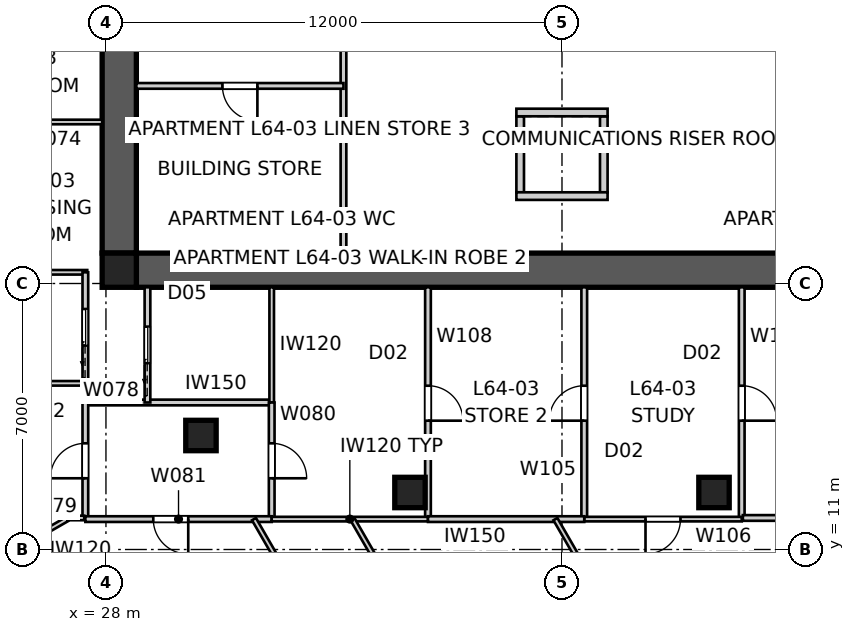
"""IFC4 building model, lengths in metres.
Left out: names, types, materials, properties, quantities, classifications, styles, units other than length and angle.
Written with IfcOpenShell. Run it as: python <this file> out.ifc"""

import sys

from ifc_helpers import new_model, si_unit, direction, frame, frame_2d, origin, origin_2d, place, context, subcontext, project, spatial, polyline, rectangle, outline, extrude, element, fill, save


model = new_model("IFC4")
c1 = context("Model", 3, precision=1e-05, world=origin(), true_north=direction((0.0, 1.0)))
c2 = subcontext(c1, "Body", "Model", "MODEL_VIEW")
j1 = project(units=[si_unit("LENGTHUNIT", "METRE"), si_unit("PLANEANGLEUNIT", "RADIAN")], contexts=[c1])
p1 = place(None, origin())
s1 = spatial("IfcSite", under=j1, at=p1, CompositionType="ELEMENT")
p2 = place(p1, origin())
s2 = spatial("IfcBuilding", under=s1, at=p2, CompositionType="ELEMENT")
p3 = place(p2, frame((0.0, 0.0, 232.0)))
s3 = spatial("IfcBuildingStorey", under=s2, at=p3, CompositionType="ELEMENT", Elevation=232.0)
p4 = place(p3, frame((51.2, 18.35, 0.0), z_axis=(0.0, 0.0, 1.0), x_axis=(-1.0, 0.0, 0.0)))
e1 = element("IfcWall", 1, at=p4, inside=s3, PredefinedType="SHEAR", context=c2, shape_type="SweptSolid", body=[
    extrude(outline(polyline([(0.0, -0.45), (22.4, -0.45), (22.4, -0.025), (22.85, -0.025), (22.85, 0.025), (22.4, 0.025), (22.4, 0.45), (0.0, 0.45), (0.0, 0.025), (-0.45, 0.025), (-0.45, -0.025), (0.0, -0.025), (0.0, -0.45)])), origin(), (0.0, 0.0, 1.0), 3.4),
])
p5 = place(p3, frame((28.35, 41.2, 0.0), z_axis=(0.0, 0.0, 1.0), x_axis=(0.0, -1.0, 0.0)))
e2 = element("IfcWall", 2, at=p5, inside=s3, PredefinedType="SHEAR", context=c2, shape_type="SweptSolid", body=[
    extrude(outline(polyline([(0.0, -0.45), (22.4, -0.45), (22.4, -0.025), (22.85, -0.025), (22.85, 0.025), (22.4, 0.025), (22.4, 0.45), (0.0, 0.45), (0.0, 0.025), (-0.45, 0.025), (-0.45, -0.025), (0.0, -0.025), (0.0, -0.45)])), origin(), (0.0, 0.0, 1.0), 3.4),
])
p6 = place(p5, frame((11.14, 0.0, 0.0)))
e3 = element("IfcOpeningElement", 3, at=p6, cuts=e2, PredefinedType="OPENING", context=c2, shape_type="SweptSolid", body=[
    extrude(rectangle(XDim=1.02, YDim=2.4, at=frame_2d((0.51, 1.2))), frame((0.0, 0.46, 0.0), z_axis=(0.0, -1.0, 0.0), x_axis=(1.0, 0.0, 0.0)), (0.0, 0.0, 1.0), 0.92),
])
for number, where, z_axis, x_axis in (
    (4, (38.9, 22.4, 0.0), (0.0, 0.0, 1.0), (0.0, -1.0, 0.0)),
    (5, (41.1, 22.4, 0.0), (0.0, 0.0, 1.0), (0.0, -1.0, 0.0)),
):
    element("IfcWall", number, at=place(p3, frame(where, z_axis=z_axis, x_axis=x_axis)), inside=s3, PredefinedType="SOLIDWALL", context=c2, shape_type="SweptSolid", body=[
        extrude(rectangle(XDim=2.0, YDim=0.2, at=frame_2d((1.0, 0.0))), origin(), (0.0, 0.0, 1.0), 3.4),
    ])
for number, where, z_axis, x_axis in (
    (6, (38.8, 22.5, 0.0), (0.0, 0.0, 1.0), (1.0, 0.0, 0.0)),
    (7, (38.8, 20.3, 0.0), (0.0, 0.0, 1.0), (1.0, 0.0, 0.0)),
):
    element("IfcWall", number, at=place(p3, frame(where, z_axis=z_axis, x_axis=x_axis)), inside=s3, PredefinedType="SOLIDWALL", context=c2, shape_type="SweptSolid", body=[
        extrude(rectangle(XDim=2.4, YDim=0.2, at=frame_2d((1.2, 0.0))), origin(), (0.0, 0.0, 1.0), 3.4),
    ])
p7 = place(p3, frame((28.35, 18.35, 0.0), z_axis=(0.0, 0.0, 1.0), x_axis=(1.0, 0.0, 0.0)))
e8 = element("IfcColumn", 8, at=p7, inside=s3, PredefinedType="COLUMN", context=c2, shape_type="SweptSolid", body=[
    extrude(rectangle(XDim=0.9, YDim=0.9, at=origin_2d()), origin(), (0.0, 0.0, 1.0), 3.4),
])
for number, where, z_axis, x_axis in (
    (9, (30.5, 14.0, 0.0), (0.0, 0.0, 1.0), (1.0, 0.0, 0.0)),
    (10, (36.0, 12.5, 0.0), (0.0, 0.0, 1.0), (1.0, 0.0, 0.0)),
    (11, (44.0, 12.5, 0.0), (0.0, 0.0, 1.0), (1.0, 0.0, 0.0)),
):
    element("IfcColumn", number, at=place(p3, frame(where, z_axis=z_axis, x_axis=x_axis)), inside=s3, PredefinedType="COLUMN", context=c2, shape_type="SweptSolid", body=[
        extrude(rectangle(XDim=0.8, YDim=0.8, at=origin_2d()), origin(), (0.0, 0.0, 1.0), 3.4),
    ])
p8 = place(p3, frame((34.25, 18.8, 0.0), z_axis=(0.0, 0.0, 1.0), x_axis=(0.0, 1.0, 0.0)))
e12 = element("IfcWall", 12, at=p8, inside=s3, PredefinedType="SOLIDWALL", context=c2, shape_type="SweptSolid", body=[
    extrude(rectangle(XDim=5.9, YDim=0.15, at=frame_2d((2.95, 0.0))), origin(), (0.0, 0.0, 1.0), 3.2),
])
p9 = place(p3, frame((34.25, 23.2, 0.0), z_axis=(0.0, 0.0, 1.0), x_axis=(-1.0, 0.0, 0.0)))
e13 = element("IfcWall", 13, at=p9, inside=s3, PredefinedType="SOLIDWALL", context=c2, shape_type="SweptSolid", body=[
    extrude(rectangle(XDim=5.45, YDim=0.15, at=frame_2d((2.725, 0.0))), origin(), (0.0, 0.0, 1.0), 3.2),
])
p10 = place(p9, frame((2.265, 0.0, 0.0)))
e14 = element("IfcOpeningElement", 14, at=p10, cuts=e13, PredefinedType="OPENING", context=c2, shape_type="SweptSolid", body=[
    extrude(rectangle(XDim=0.92, YDim=2.1, at=frame_2d((0.46, 1.05))), frame((0.0, 0.085, 0.0), z_axis=(0.0, -1.0, 0.0), x_axis=(1.0, 0.0, 0.0)), (0.0, 0.0, 1.0), 0.17),
])
p11 = place(p3, frame((27.9, 22.25, 0.0), z_axis=(0.0, 0.0, 1.0), x_axis=(-1.0, 0.0, 0.0)))
e15 = element("IfcWall", 15, at=p11, inside=s3, PredefinedType="PARTITIONING", context=c2, shape_type="SweptSolid", body=[
    extrude(rectangle(XDim=6.1, YDim=0.12, at=frame_2d((3.05, 0.0))), origin(), (0.0, 0.0, 1.0), 3.2),
])
p12 = place(p11, frame((2.57, 0.0, 0.0)))
e16 = element("IfcOpeningElement", 16, at=p12, cuts=e15, PredefinedType="OPENING", context=c2, shape_type="SweptSolid", body=[
    extrude(rectangle(XDim=0.96, YDim=2.1, at=frame_2d((0.48, 1.05))), frame((0.0, 0.07, 0.0), z_axis=(0.0, -1.0, 0.0), x_axis=(1.0, 0.0, 0.0)), (0.0, 0.0, 1.0), 0.14),
])
p13 = place(p3, frame((27.508, 18.295, 0.0), z_axis=(0.0, 0.0, 1.0), x_axis=(-1.0, 0.0, 0.0)))
e17 = element("IfcWall", 17, at=p13, inside=s3, PredefinedType="PARTITIONING", context=c2, shape_type="SweptSolid", body=[
    extrude(rectangle(XDim=5.708, YDim=0.12, at=frame_2d((2.854, 0.0))), origin(), (0.0, 0.0, 1.0), 3.2),
])
p14 = place(p3, frame((32.361, 14.869, 0.0), z_axis=(0.0, 0.0, 1.0), x_axis=(-1.0, 0.0, 0.0)))
e18 = element("IfcWall", 18, at=p14, inside=s3, PredefinedType="SOLIDWALL", context=c2, shape_type="SweptSolid", body=[
    extrude(rectangle(XDim=4.903, YDim=0.15, at=frame_2d((2.452, 0.0))), origin(), (0.0, 0.0, 1.0), 3.2),
])
p15 = place(p3, frame((32.361, 17.9, 0.0), z_axis=(0.0, 0.0, 1.0), x_axis=(0.0, -1.0, 0.0)))
e19 = element("IfcWall", 19, at=p15, inside=s3, PredefinedType="PARTITIONING", context=c2, shape_type="SweptSolid", body=[
    extrude(rectangle(XDim=3.031, YDim=0.12, at=frame_2d((1.516, 0.0))), origin(), (0.0, 0.0, 1.0), 3.2),
])
p16 = place(p3, frame((29.092, 14.869, 0.0), z_axis=(0.0, 0.0, 1.0), x_axis=(0.0, 1.0, 0.0)))
e20 = element("IfcWall", 20, at=p16, inside=s3, PredefinedType="SOLIDWALL", context=c2, shape_type="SweptSolid", body=[
    extrude(rectangle(XDim=3.031, YDim=0.15, at=frame_2d((1.516, 0.0))), origin(), (0.0, 0.0, 1.0), 3.2),
])
p17 = place(p16, frame((1.036, 0.0, 0.0)))
e21 = element("IfcOpeningElement", 21, at=p17, cuts=e20, PredefinedType="OPENING", context=c2, shape_type="SweptSolid", body=[
    extrude(rectangle(XDim=0.96, YDim=2.1, at=frame_2d((0.48, 1.05))), frame((0.0, 0.085, 0.0), z_axis=(0.0, -1.0, 0.0), x_axis=(1.0, 0.0, 0.0)), (0.0, 0.0, 1.0), 0.17),
])
p18 = place(p3, frame((27.458, 11.8, 0.0), z_axis=(0.0, 0.0, 1.0), x_axis=(0.0, 1.0, 0.0)))
e22 = element("IfcWall", 22, at=p18, inside=s3, PredefinedType="SOLIDWALL", context=c2, shape_type="SweptSolid", body=[
    extrude(rectangle(XDim=6.495, YDim=0.15, at=frame_2d((3.248, 0.0))), origin(), (0.0, 0.0, 1.0), 3.2),
])
p19 = place(p18, frame((4.569, 0.0, 0.0)))
e23 = element("IfcOpeningElement", 23, at=p19, cuts=e22, PredefinedType="OPENING", context=c2, shape_type="SweptSolid", body=[
    extrude(rectangle(XDim=0.96, YDim=2.0, at=frame_2d((0.48, 1.0))), frame((0.0, 0.085, 0.0), z_axis=(0.0, -1.0, 0.0), x_axis=(1.0, 0.0, 0.0)), (0.0, 0.0, 1.0), 0.17),
])
p20 = place(p18, frame((1.074, 0.0, 0.0)))
e24 = element("IfcOpeningElement", 24, at=p20, cuts=e22, PredefinedType="OPENING", context=c2, shape_type="SweptSolid", body=[
    extrude(rectangle(XDim=0.92, YDim=2.34, at=frame_2d((0.46, 1.17))), frame((0.0, 0.085, 0.0), z_axis=(0.0, -1.0, 0.0), x_axis=(1.0, 0.0, 0.0)), (0.0, 0.0, 1.0), 0.17),
])
p21 = place(p3, frame((32.361, 14.869, 0.0), z_axis=(0.0, 0.0, 1.0), x_axis=(0.0, -1.0, 0.0)))
e25 = element("IfcWall", 25, at=p21, inside=s3, PredefinedType="SOLIDWALL", context=c2, shape_type="SweptSolid", body=[
    extrude(rectangle(XDim=3.069, YDim=0.15, at=frame_2d((1.534, 0.0))), origin(), (0.0, 0.0, 1.0), 3.2),
])
p22 = place(p21, frame((1.074, 0.0, 0.0)))
e26 = element("IfcOpeningElement", 26, at=p22, cuts=e25, PredefinedType="OPENING", context=c2, shape_type="SweptSolid", body=[
    extrude(rectangle(XDim=0.92, YDim=2.1, at=frame_2d((0.46, 1.05))), frame((0.0, 0.085, 0.0), z_axis=(0.0, -1.0, 0.0), x_axis=(1.0, 0.0, 0.0)), (0.0, 0.0, 1.0), 0.17),
])
p23 = place(p3, frame((32.361, 11.8, 0.0), z_axis=(0.0, 0.0, 1.0), x_axis=(-1.0, 0.0, 0.0)))
e27 = element("IfcWall", 27, at=p23, inside=s3, PredefinedType="SOLIDWALL", context=c2, shape_type="SweptSolid", body=[
    extrude(rectangle(XDim=4.903, YDim=0.15, at=frame_2d((2.452, 0.0))), origin(), (0.0, 0.0, 1.0), 3.2),
])
p24 = place(p23, frame((2.196, 0.0, 0.0)))
e28 = element("IfcOpeningElement", 28, at=p24, cuts=e27, PredefinedType="OPENING", context=c2, shape_type="SweptSolid", body=[
    extrude(rectangle(XDim=0.92, YDim=2.34, at=frame_2d((0.46, 1.17))), frame((0.0, 0.085, 0.0), z_axis=(0.0, -1.0, 0.0), x_axis=(1.0, 0.0, 0.0)), (0.0, 0.0, 1.0), 0.17),
])
p25 = place(p3, frame((22.51, 15.373, 0.0), z_axis=(0.0, 0.0, 1.0), x_axis=(1.0, 0.0, 0.0)))
e29 = element("IfcWall", 29, at=p25, inside=s3, PredefinedType="PARTITIONING", context=c2, shape_type="SweptSolid", body=[
    extrude(rectangle(XDim=4.918, YDim=0.12, at=frame_2d((2.459, 0.0))), origin(), (0.0, 0.0, 1.0), 3.2),
])
p26 = place(p25, frame((1.973, 0.0, 0.0)))
e30 = element("IfcOpeningElement", 30, at=p26, cuts=e29, PredefinedType="OPENING", context=c2, shape_type="SweptSolid", body=[
    extrude(rectangle(XDim=0.96, YDim=2.1, at=frame_2d((0.48, 1.05))), frame((0.0, 0.07, 0.0), z_axis=(0.0, -1.0, 0.0), x_axis=(1.0, 0.0, 0.0)), (0.0, 0.0, 1.0), 0.14),
])
p27 = place(p3, frame((27.428, 11.83, 0.0), z_axis=(0.0, 0.0, 1.0), x_axis=(-1.0, 0.0, 0.0)))
e31 = element("IfcWall", 31, at=p27, inside=s3, PredefinedType="PARTITIONING", context=c2, shape_type="SweptSolid", body=[
    extrude(rectangle(XDim=0.421, YDim=0.12, at=frame_2d((0.211, 0.0))), origin(), (0.0, 0.0, 1.0), 3.2),
])
p28 = place(p3, frame((26.976, 11.8, 0.0), z_axis=(0.0, 0.0, 1.0), x_axis=(-0.866046860819, -0.499962833484, 0.0)))
e32 = element("IfcWall", 32, at=p28, inside=s3, PredefinedType="PARTITIONING", context=c2, shape_type="SweptSolid", body=[
    extrude(rectangle(XDim=2.081, YDim=0.12, at=frame_2d((1.041, 0.0))), origin(), (0.0, 0.0, 1.0), 3.2),
])
p29 = place(p3, frame((44.729, 17.9, 0.0), z_axis=(0.0, 0.0, 1.0), x_axis=(0.0, -1.0, 0.0)))
e33 = element("IfcWall", 33, at=p29, inside=s3, PredefinedType="SOLIDWALL", context=c2, shape_type="SweptSolid", body=[
    extrude(rectangle(XDim=6.1, YDim=0.15, at=frame_2d((3.05, 0.0))), origin(), (0.0, 0.0, 1.0), 3.2),
])
p30 = place(p29, frame((2.59, 0.0, 0.0)))
e34 = element("IfcOpeningElement", 34, at=p30, cuts=e33, PredefinedType="OPENING", context=c2, shape_type="SweptSolid", body=[
    extrude(rectangle(XDim=0.92, YDim=2.34, at=frame_2d((0.46, 1.17))), frame((0.0, 0.085, 0.0), z_axis=(0.0, -1.0, 0.0), x_axis=(1.0, 0.0, 0.0)), (0.0, 0.0, 1.0), 0.17),
])
p31 = place(p3, frame((40.586, 11.8, 0.0), z_axis=(0.0, 0.0, 1.0), x_axis=(0.0, 1.0, 0.0)))
e35 = element("IfcWall", 35, at=p31, inside=s3, PredefinedType="SOLIDWALL", context=c2, shape_type="SweptSolid", body=[
    extrude(rectangle(XDim=6.1, YDim=0.15, at=frame_2d((3.05, 0.0))), origin(), (0.0, 0.0, 1.0), 3.2),
])
p32 = place(p31, frame((2.59, 0.0, 0.0)))
e36 = element("IfcOpeningElement", 36, at=p32, cuts=e35, PredefinedType="OPENING", context=c2, shape_type="SweptSolid", body=[
    extrude(rectangle(XDim=0.92, YDim=2.34, at=frame_2d((0.46, 1.17))), frame((0.0, 0.085, 0.0), z_axis=(0.0, -1.0, 0.0), x_axis=(1.0, 0.0, 0.0)), (0.0, 0.0, 1.0), 0.17),
])
p33 = place(p3, frame((44.729, 11.8, 0.0), z_axis=(0.0, 0.0, 1.0), x_axis=(-1.0, 0.0, 0.0)))
e37 = element("IfcWall", 37, at=p33, inside=s3, PredefinedType="PARTITIONING", context=c2, shape_type="SweptSolid", body=[
    extrude(rectangle(XDim=4.144, YDim=0.12, at=frame_2d((2.072, 0.0))), origin(), (0.0, 0.0, 1.0), 3.2),
])
p34 = place(p33, frame((1.612, 0.0, 0.0)))
e38 = element("IfcOpeningElement", 38, at=p34, cuts=e37, PredefinedType="OPENING", context=c2, shape_type="SweptSolid", body=[
    extrude(rectangle(XDim=0.92, YDim=2.34, at=frame_2d((0.46, 1.17))), frame((0.0, 0.07, 0.0), z_axis=(0.0, -1.0, 0.0), x_axis=(1.0, 0.0, 0.0)), (0.0, 0.0, 1.0), 0.14),
])
p35 = place(p3, frame((50.491, 11.829, 0.0), z_axis=(0.0, 0.0, 1.0), x_axis=(-0.999999991834, 0.000127795526, 0.0)))
e39 = element("IfcWall", 39, at=p35, inside=s3, PredefinedType="SOLIDWALL", context=c2, shape_type="SweptSolid", body=[
    extrude(rectangle(XDim=5.731, YDim=0.15, at=frame_2d((2.866, 0.0))), origin(), (0.0, 0.0, 1.0), 3.2),
])
p36 = place(p3, frame((36.474, 17.9, 0.0), z_axis=(0.0, 0.0, 1.0), x_axis=(0.0, -1.0, 0.0)))
e40 = element("IfcWall", 40, at=p36, inside=s3, PredefinedType="SOLIDWALL", context=c2, shape_type="SweptSolid", body=[
    extrude(rectangle(XDim=6.1, YDim=0.15, at=frame_2d((3.05, 0.0))), origin(), (0.0, 0.0, 1.0), 3.2),
])
p37 = place(p36, frame((2.59, 0.0, 0.0)))
e41 = element("IfcOpeningElement", 41, at=p37, cuts=e40, PredefinedType="OPENING", context=c2, shape_type="SweptSolid", body=[
    extrude(rectangle(XDim=0.92, YDim=2.34, at=frame_2d((0.46, 1.17))), frame((0.0, 0.085, 0.0), z_axis=(0.0, -1.0, 0.0), x_axis=(1.0, 0.0, 0.0)), (0.0, 0.0, 1.0), 0.17),
])
p38 = place(p3, frame((36.474, 11.8, 0.0), z_axis=(0.0, 0.0, 1.0), x_axis=(-1.0, 0.0, 0.0)))
e42 = element("IfcWall", 42, at=p38, inside=s3, PredefinedType="PARTITIONING", context=c2, shape_type="SweptSolid", body=[
    extrude(rectangle(XDim=4.112, YDim=0.12, at=frame_2d((2.056, 0.0))), origin(), (0.0, 0.0, 1.0), 3.2),
])
p39 = place(p3, frame((40.586, 11.8, 0.0), z_axis=(0.0, 0.0, 1.0), x_axis=(-1.0, 0.0, 0.0)))
e43 = element("IfcWall", 43, at=p39, inside=s3, PredefinedType="SOLIDWALL", context=c2, shape_type="SweptSolid", body=[
    extrude(rectangle(XDim=4.112, YDim=0.15, at=frame_2d((2.056, 0.0))), origin(), (0.0, 0.0, 1.0), 3.2),
])
p40 = place(p3, frame((31.895, 11.8, 0.0), z_axis=(0.0, 0.0, 1.0), x_axis=(0.500002897658, -0.866023730815, 0.0)))
e44 = element("IfcWall", 44, at=p40, inside=s3, PredefinedType="PARTITIONING", context=c2, shape_type="SweptSolid", body=[
    extrude(rectangle(XDim=10.751, YDim=0.12, at=frame_2d((5.375, 0.0))), origin(), (0.0, 0.0, 1.0), 2.588),
])
p41 = place(p40, frame((4.935, 0.0, 0.0)))
e45 = element("IfcOpeningElement", 45, at=p41, cuts=e44, PredefinedType="OPENING", context=c2, shape_type="SweptSolid", body=[
    extrude(rectangle(XDim=0.92, YDim=2.34, at=frame_2d((0.46, 1.17))), frame((0.0, 0.07, 0.0), z_axis=(0.0, -1.0, 0.0), x_axis=(1.0, 0.0, 0.0)), (0.0, 0.0, 1.0), 0.14),
])
p42 = place(p3, frame((43.219, 5.924, 0.0), z_axis=(0.0, 0.0, 1.0), x_axis=(-0.500009005995, 0.866020204108, 0.0)))
e46 = element("IfcWall", 46, at=p42, inside=s3, PredefinedType="PARTITIONING", context=c2, shape_type="SweptSolid", body=[
    extrude(rectangle(XDim=6.785, YDim=0.12, at=frame_2d((3.393, 0.0))), origin(), (0.0, 0.0, 1.0), 3.2),
])
p43 = place(p3, frame((39.214, 3.612, 0.0), z_axis=(0.0, 0.0, 1.0), x_axis=(-0.49999364752, 0.86602907136, 0.0)))
e47 = element("IfcWall", 47, at=p43, inside=s3, PredefinedType="PARTITIONING", context=c2, shape_type="SweptSolid", body=[
    extrude(rectangle(XDim=9.455, YDim=0.12, at=frame_2d((4.728, 0.0))), origin(), (0.0, 0.0, 1.0), 3.2),
])
p44 = place(p43, frame((4.248, 0.0, 0.0)))
e48 = element("IfcOpeningElement", 48, at=p44, cuts=e47, PredefinedType="OPENING", context=c2, shape_type="SweptSolid", body=[
    extrude(rectangle(XDim=0.92, YDim=2.34, at=frame_2d((0.46, 1.17))), frame((0.0, 0.07, 0.0), z_axis=(0.0, -1.0, 0.0), x_axis=(1.0, 0.0, 0.0)), (0.0, 0.0, 1.0), 0.14),
])
p45 = place(p10, origin())
e49 = element("IfcDoor", 49, at=p45, inside=s3, OperationType="SINGLE_SWING_LEFT", PredefinedType="DOOR", context=c2, shape_type="SweptSolid", body=[
    extrude(rectangle(XDim=0.92, YDim=2.1, at=frame_2d((0.46, 1.05))), frame((0.0, 0.025, 0.0), z_axis=(0.0, -1.0, 0.0), x_axis=(1.0, 0.0, 0.0)), (0.0, 0.0, 1.0), 0.05),
])
fill(e14, e49)
p46 = place(p19, origin())
e50 = element("IfcDoor", 50, at=p46, inside=s3, OperationType="SLIDING_TO_LEFT", PredefinedType="DOOR", context=c2, shape_type="SweptSolid", body=[
    extrude(rectangle(XDim=0.96, YDim=2.0, at=frame_2d((0.48, 1.0))), frame((0.0, 0.025, 0.0), z_axis=(0.0, -1.0, 0.0), x_axis=(1.0, 0.0, 0.0)), (0.0, 0.0, 1.0), 0.05),
])
fill(e23, e50)
p47 = place(p20, origin())
e51 = element("IfcDoor", 51, at=p47, inside=s3, OperationType="SINGLE_SWING_LEFT", PredefinedType="DOOR", context=c2, shape_type="SweptSolid", body=[
    extrude(rectangle(XDim=0.92, YDim=2.34, at=frame_2d((0.46, 1.17))), frame((0.0, 0.025, 0.0), z_axis=(0.0, -1.0, 0.0), x_axis=(1.0, 0.0, 0.0)), (0.0, 0.0, 1.0), 0.05),
])
fill(e24, e51)
p48 = place(p17, origin())
e52 = element("IfcDoor", 52, at=p48, inside=s3, OperationType="SLIDING_TO_LEFT", PredefinedType="DOOR", context=c2, shape_type="SweptSolid", body=[
    extrude(rectangle(XDim=0.96, YDim=2.1, at=frame_2d((0.48, 1.05))), frame((0.0, 0.025, 0.0), z_axis=(0.0, -1.0, 0.0), x_axis=(1.0, 0.0, 0.0)), (0.0, 0.0, 1.0), 0.05),
])
fill(e21, e52)
p49 = place(p24, origin())
e53 = element("IfcDoor", 53, at=p49, inside=s3, OperationType="SINGLE_SWING_LEFT", PredefinedType="DOOR", context=c2, shape_type="SweptSolid", body=[
    extrude(rectangle(XDim=0.92, YDim=2.34, at=frame_2d((0.46, 1.17))), frame((0.0, 0.025, 0.0), z_axis=(0.0, -1.0, 0.0), x_axis=(1.0, 0.0, 0.0)), (0.0, 0.0, 1.0), 0.05),
])
fill(e28, e53)
p50 = place(p22, origin())
e54 = element("IfcDoor", 54, at=p50, inside=s3, OperationType="SINGLE_SWING_RIGHT", PredefinedType="DOOR", context=c2, shape_type="SweptSolid", body=[
    extrude(rectangle(XDim=0.92, YDim=2.1, at=frame_2d((0.46, 1.05))), frame((0.0, 0.025, 0.0), z_axis=(0.0, -1.0, 0.0), x_axis=(1.0, 0.0, 0.0)), (0.0, 0.0, 1.0), 0.05),
])
fill(e26, e54)
p51 = place(p37, origin())
e55 = element("IfcDoor", 55, at=p51, inside=s3, OperationType="SINGLE_SWING_RIGHT", PredefinedType="DOOR", context=c2, shape_type="SweptSolid", body=[
    extrude(rectangle(XDim=0.92, YDim=2.34, at=frame_2d((0.46, 1.17))), frame((0.0, 0.025, 0.0), z_axis=(0.0, -1.0, 0.0), x_axis=(1.0, 0.0, 0.0)), (0.0, 0.0, 1.0), 0.05),
])
fill(e41, e55)
p52 = place(p32, origin())
e56 = element("IfcDoor", 56, at=p52, inside=s3, OperationType="SINGLE_SWING_LEFT", PredefinedType="DOOR", context=c2, shape_type="SweptSolid", body=[
    extrude(rectangle(XDim=0.92, YDim=2.34, at=frame_2d((0.46, 1.17))), frame((0.0, 0.025, 0.0), z_axis=(0.0, -1.0, 0.0), x_axis=(1.0, 0.0, 0.0)), (0.0, 0.0, 1.0), 0.05),
])
fill(e36, e56)
p53 = place(p30, origin())
e57 = element("IfcDoor", 57, at=p53, inside=s3, OperationType="SINGLE_SWING_RIGHT", PredefinedType="DOOR", context=c2, shape_type="SweptSolid", body=[
    extrude(rectangle(XDim=0.92, YDim=2.34, at=frame_2d((0.46, 1.17))), frame((0.0, 0.025, 0.0), z_axis=(0.0, -1.0, 0.0), x_axis=(1.0, 0.0, 0.0)), (0.0, 0.0, 1.0), 0.05),
])
fill(e34, e57)
p54 = place(p34, origin())
e58 = element("IfcDoor", 58, at=p54, inside=s3, OperationType="SINGLE_SWING_RIGHT", PredefinedType="DOOR", context=c2, shape_type="SweptSolid", body=[
    extrude(rectangle(XDim=0.92, YDim=2.34, at=frame_2d((0.46, 1.17))), frame((0.0, 0.025, 0.0), z_axis=(0.0, -1.0, 0.0), x_axis=(1.0, 0.0, 0.0)), (0.0, 0.0, 1.0), 0.05),
])
fill(e38, e58)
save(model, sys.argv[1])
